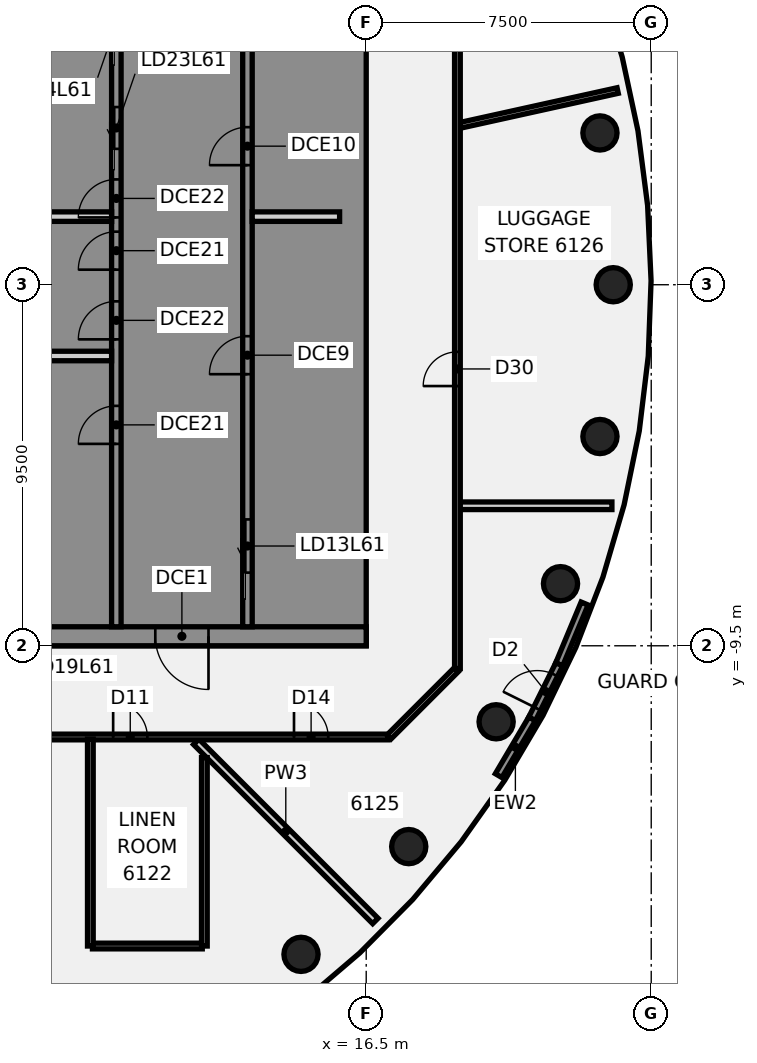
"""IFC4 building model, lengths in metres.
Left out: names, types, materials, properties, quantities, classifications, styles, units other than length and angle.
Written with IfcOpenShell. Run it as: python <this file> out.ifc"""

import sys

from ifc_helpers import new_model, si_unit, direction, frame, frame_2d, origin, origin_2d, place, context, subcontext, project, spatial, polyline, rectangle, circle, outline, extrude, element, fill, save


model = new_model("IFC4")
c1 = context("Model", 3, precision=1e-05, world=origin(), true_north=direction((0.0, 1.0)))
c2 = subcontext(c1, "Body", "Model", "MODEL_VIEW")
j1 = project(units=[si_unit("LENGTHUNIT", "METRE"), si_unit("PLANEANGLEUNIT", "RADIAN")], contexts=[c1])
p1 = place(None, origin())
s1 = spatial("IfcSite", under=j1, at=p1, CompositionType="ELEMENT")
p2 = place(p1, origin())
s2 = spatial("IfcBuilding", under=s1, at=p2, CompositionType="ELEMENT")
p3 = place(p2, frame((0.0, 0.0, 241.5)))
s3 = spatial("IfcBuildingStorey", under=s2, at=p3, CompositionType="ELEMENT", Elevation=241.5)
for number, where, z_axis, x_axis in (
    (1, (23.0, 0.0, -0.14), (0.0, 0.0, 1.0), (1.0, 0.0, 0.0)),
    (2, (22.651, 3.994, -0.14), (0.0, 0.0, 1.0), (1.0, 0.0, 0.0)),
    (3, (14.784, -17.619, -0.14), (0.0, 0.0, 1.0), (1.0, 0.0, 0.0)),
    (4, (17.619, -14.784, -0.14), (0.0, 0.0, 1.0), (1.0, 0.0, 0.0)),
    (5, (19.919, -11.5, -0.14), (0.0, 0.0, 1.0), (1.0, 0.0, 0.0)),
    (6, (21.613, -7.866, -0.14), (0.0, 0.0, 1.0), (1.0, 0.0, 0.0)),
    (7, (22.651, -3.994, -0.14), (0.0, 0.0, 1.0), (1.0, 0.0, 0.0)),
):
    element("IfcColumn", number, at=place(p3, frame(where, z_axis=z_axis, x_axis=x_axis)), inside=s3, PredefinedType="COLUMN", context=c2, shape_type="SweptSolid", body=[
        extrude(circle(Radius=0.45, at=origin_2d()), origin(), (0.0, 0.0, 1.0), 3.6),
    ])
p4 = place(p3, frame((12.027, -12.027, 0.0), z_axis=(0.0, 0.0, 1.0), x_axis=(0.707106781187, -0.707106781187, 0.0)))
e8 = element("IfcWall", 8, at=p4, inside=s3, PredefinedType="PARTITIONING", context=c2, shape_type="SweptSolid", body=[
    extrude(rectangle(XDim=6.665, YDim=0.2, at=frame_2d((3.333, 0.0))), origin(), (0.0, 0.0, 1.0), 2.864),
])
p5 = place(p3, frame((-17.1, -11.9, 0.0), z_axis=(0.0, 0.0, 1.0), x_axis=(1.0, 0.0, 0.0)))
e9 = element("IfcWall", 9, at=p5, inside=s3, PredefinedType="PARTITIONING", context=c2, shape_type="SweptSolid", body=[
    extrude(rectangle(XDim=34.165, YDim=0.15, at=frame_2d((17.083, 0.0))), origin(), (0.0, 0.0, 1.0), 2.864),
])
p6 = place(p5, frame((7.0, 0.0, 0.0)))
e10 = element("IfcOpeningElement", 10, at=p6, cuts=e9, PredefinedType="OPENING", context=c2, shape_type="SweptSolid", body=[
    extrude(rectangle(XDim=0.9, YDim=2.1, at=frame_2d((0.45, 1.05))), frame((0.0, 0.085, 0.0), z_axis=(0.0, -1.0, 0.0), x_axis=(1.0, 0.0, 0.0)), (0.0, 0.0, 1.0), 0.17),
])
p7 = place(p5, frame((26.941, 0.0, 0.0)))
e11 = element("IfcOpeningElement", 11, at=p7, cuts=e9, PredefinedType="OPENING", context=c2, shape_type="SweptSolid", body=[
    extrude(rectangle(XDim=0.9, YDim=2.1, at=frame_2d((0.45, 1.05))), frame((0.0, 0.085, 0.0), z_axis=(0.0, -1.0, 0.0), x_axis=(1.0, 0.0, 0.0)), (0.0, 0.0, 1.0), 0.17),
])
p8 = place(p5, frame((19.152, 0.0, 0.0)))
e12 = element("IfcOpeningElement", 12, at=p8, cuts=e9, PredefinedType="OPENING", context=c2, shape_type="SweptSolid", body=[
    extrude(rectangle(XDim=1.8, YDim=2.1, at=frame_2d((0.9, 1.05))), frame((0.0, 0.085, 0.0), z_axis=(0.0, -1.0, 0.0), x_axis=(1.0, 0.0, 0.0)), (0.0, 0.0, 1.0), 0.17),
])
p9 = place(p5, frame((10.359, 0.0, 0.0)))
e13 = element("IfcOpeningElement", 13, at=p9, cuts=e9, PredefinedType="OPENING", context=c2, shape_type="SweptSolid", body=[
    extrude(rectangle(XDim=1.8, YDim=2.1, at=frame_2d((0.9, 1.05))), frame((0.0, 0.085, 0.0), z_axis=(0.0, -1.0, 0.0), x_axis=(1.0, 0.0, 0.0)), (0.0, 0.0, 1.0), 0.17),
])
p10 = place(p5, frame((31.7, 0.0, 0.0)))
e14 = element("IfcOpeningElement", 14, at=p10, cuts=e9, PredefinedType="OPENING", context=c2, shape_type="SweptSolid", body=[
    extrude(rectangle(XDim=0.9, YDim=2.1, at=frame_2d((0.45, 1.05))), frame((0.0, 0.085, 0.0), z_axis=(0.0, -1.0, 0.0), x_axis=(1.0, 0.0, 0.0)), (0.0, 0.0, 1.0), 0.17),
])
p11 = place(p5, frame((2.85, 0.0, 0.0)))
e15 = element("IfcOpeningElement", 15, at=p11, cuts=e9, PredefinedType="OPENING", context=c2, shape_type="SweptSolid", body=[
    extrude(rectangle(XDim=0.9, YDim=2.1, at=frame_2d((0.45, 1.05))), frame((0.0, 0.085, 0.0), z_axis=(0.0, -1.0, 0.0), x_axis=(1.0, 0.0, 0.0)), (0.0, 0.0, 1.0), 0.17),
])
p12 = place(p3, frame((9.296, -17.4, 0.0), z_axis=(0.0, 0.0, 1.0), x_axis=(1.0, 0.0, 0.0)))
e16 = element("IfcWall", 16, at=p12, inside=s3, PredefinedType="PARTITIONING", context=c2, shape_type="SweptSolid", body=[
    extrude(rectangle(XDim=2.89, YDim=0.15, at=frame_2d((1.445, 0.0))), origin(), (0.0, 0.0, 1.0), 2.864),
])
p13 = place(p3, frame((18.955, -5.816, 0.0), z_axis=(0.0, 0.0, 1.0), x_axis=(1.0, 0.0, 0.0)))
e17 = element("IfcWall", 17, at=p13, inside=s3, PredefinedType="PARTITIONING", context=c2, shape_type="SweptSolid", body=[
    extrude(rectangle(XDim=4.011, YDim=0.2, at=frame_2d((2.005, 0.0))), origin(), (0.0, 0.0, 1.0), 2.864),
])
p14 = place(p3, frame((18.973, 4.194, 0.0), z_axis=(0.0, 0.0, 1.0), x_axis=(0.976439523163, 0.215791236162, 0.0)))
e18 = element("IfcWall", 18, at=p14, inside=s3, PredefinedType="PARTITIONING", context=c2, shape_type="SweptSolid", body=[
    extrude(rectangle(XDim=4.244, YDim=0.15, at=frame_2d((2.122, 0.0))), origin(), (0.0, 0.0, 1.0), 2.864),
])
p15 = place(p3, frame((17.1, -11.9, 0.0), z_axis=(0.0, 0.0, 1.0), x_axis=(0.707106781187, 0.707106781187, 0.0)))
e19 = element("IfcWall", 19, at=p15, inside=s3, PredefinedType="PARTITIONING", context=c2, shape_type="SweptSolid", body=[
    extrude(rectangle(XDim=2.505, YDim=0.15, at=frame_2d((1.253, 0.0))), origin(), (0.0, 0.0, 1.0), 2.864),
])
p16 = place(p3, frame((9.241, -17.4, 0.0), z_axis=(0.0, 0.0, 1.0), x_axis=(0.0, 1.0, 0.0)))
e20 = element("IfcWall", 20, at=p16, inside=s3, PredefinedType="PARTITIONING", context=c2, shape_type="SweptSolid", body=[
    extrude(rectangle(XDim=5.445, YDim=0.15, at=frame_2d((2.722, 0.0))), origin(), (0.0, 0.0, 1.0), 2.864),
])
p17 = place(p3, frame((12.241, -17.4, 0.0), z_axis=(0.0, 0.0, 1.0), x_axis=(0.0, 1.0, 0.0)))
e21 = element("IfcWall", 21, at=p17, inside=s3, PredefinedType="PARTITIONING", context=c2, shape_type="SweptSolid", body=[
    extrude(rectangle(XDim=4.959, YDim=0.15, at=frame_2d((2.479, 0.0))), origin(), (0.0, 0.0, 1.0), 2.864),
])
p18 = place(p3, frame((18.9, -10.1, 0.0), z_axis=(0.0, 0.0, 1.0), x_axis=(0.0, 1.0, 0.0)))
e22 = element("IfcWall", 22, at=p18, inside=s3, PredefinedType="PARTITIONING", context=c2, shape_type="SweptSolid", body=[
    extrude(rectangle(XDim=20.2, YDim=0.15, at=frame_2d((10.1, 0.0))), origin(), (0.0, 0.0, 1.0), 2.864),
])
p19 = place(p18, frame((7.434, 0.0, 0.0)))
e23 = element("IfcOpeningElement", 23, at=p19, cuts=e22, PredefinedType="OPENING", context=c2, shape_type="SweptSolid", body=[
    extrude(rectangle(XDim=0.9, YDim=2.1, at=frame_2d((0.45, 1.05))), frame((0.0, 0.085, 0.0), z_axis=(0.0, -1.0, 0.0), x_axis=(1.0, 0.0, 0.0)), (0.0, 0.0, 1.0), 0.17),
])
p20 = place(p3, frame((19.984, -12.917, 0.0), z_axis=(0.0, 0.0, 1.0), x_axis=(0.508156160985, 0.861264951135, 0.0)))
e24 = element("IfcWall", 24, at=p20, inside=s3, PredefinedType="SOLIDWALL", context=c2, shape_type="SweptSolid", body=[
    extrude(rectangle(XDim=1.737, YDim=0.2, at=frame_2d((0.868, 0.0))), origin(), (0.0, 0.0, 1.0), 3.46),
])
p21 = place(p3, frame((21.579, -9.989, 0.0), z_axis=(0.0, 0.0, 1.0), x_axis=(0.385174693912, 0.92284367862, 0.0)))
e25 = element("IfcWall", 25, at=p21, inside=s3, PredefinedType="SOLIDWALL", context=c2, shape_type="SweptSolid", body=[
    extrude(rectangle(XDim=1.735, YDim=0.2, at=frame_2d((0.868, 0.0))), origin(), (0.0, 0.0, 1.0), 3.46),
])
p22 = place(p3, frame((20.867, -11.421, 0.0), z_axis=(0.0, 0.0, 1.0), x_axis=(0.445441942317, 0.895310826487, 0.0)))
e26 = element("IfcWall", 26, at=p22, inside=s3, PredefinedType="SOLIDWALL", context=c2, shape_type="SweptSolid", body=[
    extrude(rectangle(XDim=1.599, YDim=0.2, at=frame_2d((0.8, 0.0))), origin(), (0.0, 0.0, 1.0), 3.46),
])
p23 = place(p22, frame((0.3, 0.0, 0.0)))
e27 = element("IfcOpeningElement", 27, at=p23, cuts=e26, PredefinedType="OPENING", context=c2, shape_type="SweptSolid", body=[
    extrude(rectangle(XDim=1.0, YDim=2.4, at=frame_2d((0.5, 1.2))), frame((0.0, 0.11, 0.0), z_axis=(0.0, -1.0, 0.0), x_axis=(1.0, 0.0, 0.0)), (0.0, 0.0, 1.0), 0.22),
])
p24 = place(p3, frame((16.5, -9.25, 0.0), z_axis=(0.0, 0.0, 1.0), x_axis=(-1.0, 0.0, 0.0)))
e28 = element("IfcWall", 28, at=p24, inside=s3, PredefinedType="SHEAR", context=c2, shape_type="SweptSolid", body=[
    extrude(rectangle(XDim=13.0, YDim=0.5, at=frame_2d((6.5, 0.0))), origin(), (0.0, 0.0, 1.0), 3.46),
])
p25 = place(p24, frame((4.15, 0.0, 0.0)))
e29 = element("IfcOpeningElement", 29, at=p25, cuts=e28, PredefinedType="OPENING", context=c2, shape_type="SweptSolid", body=[
    extrude(rectangle(XDim=1.4, YDim=2.1, at=frame_2d((0.7, 1.05))), frame((0.0, 0.26, 0.0), z_axis=(0.0, -1.0, 0.0), x_axis=(1.0, 0.0, 0.0)), (0.0, 0.0, 1.0), 0.52),
])
p26 = place(p24, frame((10.125, 0.0, 0.0)))
e30 = element("IfcOpeningElement", 30, at=p26, cuts=e28, PredefinedType="OPENING", context=c2, shape_type="SweptSolid", body=[
    extrude(rectangle(XDim=1.4, YDim=2.1, at=frame_2d((0.7, 1.05))), frame((0.0, 0.26, 0.0), z_axis=(0.0, -1.0, 0.0), x_axis=(1.0, 0.0, 0.0)), (0.0, 0.0, 1.0), 0.52),
])
p27 = place(p3, origin())
e31 = element("IfcWall", 31, at=p27, inside=s3, PredefinedType="SHEAR", context=c2, shape_type="SweptSolid", body=[
    extrude(outline(polyline([(13.5, -8.125), (13.5, -9.0), (16.0, -9.0), (16.5, -9.0), (16.5, 9.0), (16.0, 9.0), (13.5, 9.0), (13.5, 8.125), (16.0, 8.125), (16.0, 5.625), (13.5, 5.625), (13.5, 5.375), (16.0, 5.375), (16.0, -5.375), (13.5, -5.375), (13.5, -5.625), (16.0, -5.625), (16.0, -8.125), (13.5, -8.125)])), origin(), (0.0, 0.0, 1.0), 3.46),
])
p28 = place(p3, origin())
e32 = element("IfcWall", 32, at=p28, inside=s3, PredefinedType="SHEAR", context=c2, shape_type="SweptSolid", body=[
    extrude(outline(polyline([(9.8, -5.375), (7.5, -5.375), (7.5, 2.625), (9.8, 2.625), (9.8, 2.875), (7.5, 2.875), (7.5, 5.375), (9.8, 5.375), (9.8, 5.625), (7.5, 5.625), (7.5, 8.125), (9.8, 8.125), (9.8, 9.0), (7.5, 9.0), (7.25, 9.0), (7.25, -5.625), (7.5, -5.625), (9.8, -5.625), (9.8, -5.375)])), origin(), (0.0, 0.0, 1.0), 3.46),
])
p29 = place(p3, origin())
e33 = element("IfcWall", 33, at=p29, inside=s3, PredefinedType="SHEAR", context=c2, shape_type="SweptSolid", body=[
    extrude(outline(polyline([(7.5, -8.125), (7.5, -9.0), (9.8, -9.0), (9.8, -8.125), (9.8, -5.625), (9.55, -5.625), (9.55, -8.125), (7.5, -8.125)])), origin(), (0.0, 0.0, 1.0), 3.46),
])
p30 = place(p3, frame((13.375, -9.0, 0.0), z_axis=(0.0, 0.0, 1.0), x_axis=(0.0, 1.0, 0.0)))
e34 = element("IfcWall", 34, at=p30, inside=s3, PredefinedType="SHEAR", context=c2, shape_type="SweptSolid", body=[
    extrude(rectangle(XDim=18.0, YDim=0.25, at=frame_2d((9.0, 0.0))), origin(), (0.0, 0.0, 1.0), 3.46),
])
p31 = place(p30, frame((1.425, 0.0, 0.0)))
e35 = element("IfcOpeningElement", 35, at=p31, cuts=e34, PredefinedType="OPENING", context=c2, shape_type="SweptSolid", body=[
    extrude(rectangle(XDim=1.4, YDim=2.1, at=frame_2d((0.7, 1.05))), frame((0.0, 0.135, 0.0), z_axis=(0.0, -1.0, 0.0), x_axis=(1.0, 0.0, 0.0)), (0.0, 0.0, 1.0), 0.27),
])
p32 = place(p30, frame((6.646, 0.0, 0.0)))
e36 = element("IfcOpeningElement", 36, at=p32, cuts=e34, PredefinedType="OPENING", context=c2, shape_type="SweptSolid", body=[
    extrude(rectangle(XDim=1.0, YDim=2.1, at=frame_2d((0.5, 1.05))), frame((0.0, 0.135, 0.0), z_axis=(0.0, -1.0, 0.0), x_axis=(1.0, 0.0, 0.0)), (0.0, 0.0, 1.0), 0.27),
])
p33 = place(p30, frame((12.146, 0.0, 0.0)))
e37 = element("IfcOpeningElement", 37, at=p33, cuts=e34, PredefinedType="OPENING", context=c2, shape_type="SweptSolid", body=[
    extrude(rectangle(XDim=1.0, YDim=2.1, at=frame_2d((0.5, 1.05))), frame((0.0, 0.135, 0.0), z_axis=(0.0, -1.0, 0.0), x_axis=(1.0, 0.0, 0.0)), (0.0, 0.0, 1.0), 0.27),
])
p34 = place(p3, frame((9.925, -9.0, 0.0), z_axis=(0.0, 0.0, 1.0), x_axis=(0.0, 1.0, 0.0)))
e38 = element("IfcWall", 38, at=p34, inside=s3, PredefinedType="SHEAR", context=c2, shape_type="SweptSolid", body=[
    extrude(rectangle(XDim=18.0, YDim=0.25, at=frame_2d((9.0, 0.0))), origin(), (0.0, 0.0, 1.0), 3.46),
])
p35 = place(p34, frame((12.575, 0.0, 0.0)))
e39 = element("IfcOpeningElement", 39, at=p35, cuts=e38, PredefinedType="OPENING", context=c2, shape_type="SweptSolid", body=[
    extrude(rectangle(XDim=1.1, YDim=2.1, at=frame_2d((0.55, 1.05))), frame((0.0, 0.135, 0.0), z_axis=(0.0, -1.0, 0.0), x_axis=(1.0, 0.0, 0.0)), (0.0, 0.0, 1.0), 0.27),
])
p36 = place(p34, frame((15.325, 0.0, 0.0)))
e40 = element("IfcOpeningElement", 40, at=p36, cuts=e38, PredefinedType="OPENING", context=c2, shape_type="SweptSolid", body=[
    extrude(rectangle(XDim=1.1, YDim=2.1, at=frame_2d((0.55, 1.05))), frame((0.0, 0.135, 0.0), z_axis=(0.0, -1.0, 0.0), x_axis=(1.0, 0.0, 0.0)), (0.0, 0.0, 1.0), 0.27),
])
p37 = place(p34, frame((4.812, 0.0, 0.0)))
e41 = element("IfcOpeningElement", 41, at=p37, cuts=e38, PredefinedType="OPENING", context=c2, shape_type="SweptSolid", body=[
    extrude(rectangle(XDim=1.0, YDim=2.1, at=frame_2d((0.5, 1.05))), frame((0.0, 0.135, 0.0), z_axis=(0.0, -1.0, 0.0), x_axis=(1.0, 0.0, 0.0)), (0.0, 0.0, 1.0), 0.27),
])
p38 = place(p34, frame((7.562, 0.0, 0.0)))
e42 = element("IfcOpeningElement", 42, at=p38, cuts=e38, PredefinedType="OPENING", context=c2, shape_type="SweptSolid", body=[
    extrude(rectangle(XDim=1.0, YDim=2.1, at=frame_2d((0.5, 1.05))), frame((0.0, 0.135, 0.0), z_axis=(0.0, -1.0, 0.0), x_axis=(1.0, 0.0, 0.0)), (0.0, 0.0, 1.0), 0.27),
])
p39 = place(p34, frame((9.396, 0.0, 0.0)))
e43 = element("IfcOpeningElement", 43, at=p39, cuts=e38, PredefinedType="OPENING", context=c2, shape_type="SweptSolid", body=[
    extrude(rectangle(XDim=1.0, YDim=2.1, at=frame_2d((0.5, 1.05))), frame((0.0, 0.135, 0.0), z_axis=(0.0, -1.0, 0.0), x_axis=(1.0, 0.0, 0.0)), (0.0, 0.0, 1.0), 0.27),
])
p40 = place(p34, frame((10.771, 0.0, 0.0)))
e44 = element("IfcOpeningElement", 44, at=p40, cuts=e38, PredefinedType="OPENING", context=c2, shape_type="SweptSolid", body=[
    extrude(rectangle(XDim=1.0, YDim=2.1, at=frame_2d((0.5, 1.05))), frame((0.0, 0.135, 0.0), z_axis=(0.0, -1.0, 0.0), x_axis=(1.0, 0.0, 0.0)), (0.0, 0.0, 1.0), 0.27),
])
for number, where, z_axis, x_axis in (
    (45, (15.8, 1.792, 0.0), (0.0, 0.0, 1.0), (-1.0, 0.0, 0.0)),
    (46, (9.8, -1.875, 0.0), (0.0, 0.0, 1.0), (-1.0, 0.0, 0.0)),
    (47, (9.8, 1.792, 0.0), (0.0, 0.0, 1.0), (-1.0, 0.0, 0.0)),
):
    element("IfcWall", number, at=place(p3, frame(where, z_axis=z_axis, x_axis=x_axis)), inside=s3, PredefinedType="PARTITIONING", context=c2, shape_type="SweptSolid", body=[
        extrude(rectangle(XDim=2.3, YDim=0.25, at=frame_2d((1.15, 0.0))), origin(), (0.0, 0.0, 1.0), 3.46),
    ])
p41 = place(p7, frame((0.9, 0.0, 0.0), z_axis=(0.0, 0.0, 1.0), x_axis=(-1.0, 0.0, 0.0)))
e48 = element("IfcDoor", 48, at=p41, inside=s3, OperationType="SINGLE_SWING_RIGHT", PredefinedType="DOOR", context=c2, shape_type="SweptSolid", body=[
    extrude(rectangle(XDim=0.9, YDim=2.1, at=frame_2d((0.45, 1.05))), frame((0.0, 0.025, 0.0), z_axis=(0.0, -1.0, 0.0), x_axis=(1.0, 0.0, 0.0)), (0.0, 0.0, 1.0), 0.05),
])
fill(e11, e48)
p42 = place(p10, frame((0.9, 0.0, 0.0), z_axis=(0.0, 0.0, 1.0), x_axis=(-1.0, 0.0, 0.0)))
e49 = element("IfcDoor", 49, at=p42, inside=s3, OperationType="SINGLE_SWING_RIGHT", PredefinedType="DOOR", context=c2, shape_type="SweptSolid", body=[
    extrude(rectangle(XDim=0.9, YDim=2.1, at=frame_2d((0.45, 1.05))), frame((0.0, 0.025, 0.0), z_axis=(0.0, -1.0, 0.0), x_axis=(1.0, 0.0, 0.0)), (0.0, 0.0, 1.0), 0.05),
])
fill(e14, e49)
p43 = place(p19, frame((0.9, 0.0, 0.0), z_axis=(0.0, 0.0, 1.0), x_axis=(-1.0, 0.0, 0.0)))
e50 = element("IfcDoor", 50, at=p43, inside=s3, OperationType="SINGLE_SWING_LEFT", PredefinedType="DOOR", context=c2, shape_type="SweptSolid", body=[
    extrude(rectangle(XDim=0.9, YDim=2.1, at=frame_2d((0.45, 1.05))), frame((0.0, 0.025, 0.0), z_axis=(0.0, -1.0, 0.0), x_axis=(1.0, 0.0, 0.0)), (0.0, 0.0, 1.0), 0.05),
])
fill(e23, e50)
p44 = place(p23, origin())
e51 = element("IfcDoor", 51, at=p44, inside=s3, OperationType="SINGLE_SWING_LEFT", PredefinedType="DOOR", context=c2, shape_type="SweptSolid", body=[
    extrude(rectangle(XDim=1.0, YDim=2.4, at=frame_2d((0.5, 1.2))), frame((0.0, 0.025, 0.0), z_axis=(0.0, -1.0, 0.0), x_axis=(1.0, 0.0, 0.0)), (0.0, 0.0, 1.0), 0.05),
])
fill(e27, e51)
p45 = place(p25, origin())
e52 = element("IfcDoor", 52, at=p45, inside=s3, OperationType="SINGLE_SWING_LEFT", PredefinedType="DOOR", context=c2, shape_type="SweptSolid", body=[
    extrude(rectangle(XDim=1.4, YDim=2.1, at=frame_2d((0.7, 1.05))), frame((0.0, 0.025, 0.0), z_axis=(0.0, -1.0, 0.0), x_axis=(1.0, 0.0, 0.0)), (0.0, 0.0, 1.0), 0.05),
])
fill(e29, e52)
p46 = place(p31, origin())
e53 = element("IfcDoor", 53, at=p46, inside=s3, OperationType="SLIDING_TO_LEFT", PredefinedType="DOOR", context=c2, shape_type="SweptSolid", body=[
    extrude(rectangle(XDim=1.4, YDim=2.1, at=frame_2d((0.7, 1.05))), frame((0.0, 0.025, 0.0), z_axis=(0.0, -1.0, 0.0), x_axis=(1.0, 0.0, 0.0)), (0.0, 0.0, 1.0), 0.05),
])
fill(e35, e53)
p47 = place(p35, origin())
e54 = element("IfcDoor", 54, at=p47, inside=s3, OperationType="SLIDING_TO_LEFT", PredefinedType="DOOR", context=c2, shape_type="SweptSolid", body=[
    extrude(rectangle(XDim=1.1, YDim=2.1, at=frame_2d((0.55, 1.05))), frame((0.0, 0.025, 0.0), z_axis=(0.0, -1.0, 0.0), x_axis=(1.0, 0.0, 0.0)), (0.0, 0.0, 1.0), 0.05),
])
fill(e39, e54)
p48 = place(p32, origin())
e55 = element("IfcDoor", 55, at=p48, inside=s3, OperationType="SINGLE_SWING_LEFT", PredefinedType="DOOR", context=c2, shape_type="SweptSolid", body=[
    extrude(rectangle(XDim=1.0, YDim=2.1, at=frame_2d((0.5, 1.05))), frame((0.0, 0.025, 0.0), z_axis=(0.0, -1.0, 0.0), x_axis=(1.0, 0.0, 0.0)), (0.0, 0.0, 1.0), 0.05),
])
fill(e36, e55)
p49 = place(p33, origin())
e56 = element("IfcDoor", 56, at=p49, inside=s3, OperationType="SINGLE_SWING_LEFT", PredefinedType="DOOR", context=c2, shape_type="SweptSolid", body=[
    extrude(rectangle(XDim=1.0, YDim=2.1, at=frame_2d((0.5, 1.05))), frame((0.0, 0.025, 0.0), z_axis=(0.0, -1.0, 0.0), x_axis=(1.0, 0.0, 0.0)), (0.0, 0.0, 1.0), 0.05),
])
fill(e37, e56)
p50 = place(p37, origin())
e57 = element("IfcDoor", 57, at=p50, inside=s3, OperationType="SINGLE_SWING_LEFT", PredefinedType="DOOR", context=c2, shape_type="SweptSolid", body=[
    extrude(rectangle(XDim=1.0, YDim=2.1, at=frame_2d((0.5, 1.05))), frame((0.0, 0.025, 0.0), z_axis=(0.0, -1.0, 0.0), x_axis=(1.0, 0.0, 0.0)), (0.0, 0.0, 1.0), 0.05),
])
fill(e41, e57)
p51 = place(p38, origin())
e58 = element("IfcDoor", 58, at=p51, inside=s3, OperationType="SINGLE_SWING_LEFT", PredefinedType="DOOR", context=c2, shape_type="SweptSolid", body=[
    extrude(rectangle(XDim=1.0, YDim=2.1, at=frame_2d((0.5, 1.05))), frame((0.0, 0.025, 0.0), z_axis=(0.0, -1.0, 0.0), x_axis=(1.0, 0.0, 0.0)), (0.0, 0.0, 1.0), 0.05),
])
fill(e42, e58)
p52 = place(p39, origin())
e59 = element("IfcDoor", 59, at=p52, inside=s3, OperationType="SINGLE_SWING_LEFT", PredefinedType="DOOR", context=c2, shape_type="SweptSolid", body=[
    extrude(rectangle(XDim=1.0, YDim=2.1, at=frame_2d((0.5, 1.05))), frame((0.0, 0.025, 0.0), z_axis=(0.0, -1.0, 0.0), x_axis=(1.0, 0.0, 0.0)), (0.0, 0.0, 1.0), 0.05),
])
fill(e43, e59)
p53 = place(p40, origin())
e60 = element("IfcDoor", 60, at=p53, inside=s3, OperationType="SINGLE_SWING_LEFT", PredefinedType="DOOR", context=c2, shape_type="SweptSolid", body=[
    extrude(rectangle(XDim=1.0, YDim=2.1, at=frame_2d((0.5, 1.05))), frame((0.0, 0.025, 0.0), z_axis=(0.0, -1.0, 0.0), x_axis=(1.0, 0.0, 0.0)), (0.0, 0.0, 1.0), 0.05),
])
fill(e44, e60)
save(model, sys.argv[1])
